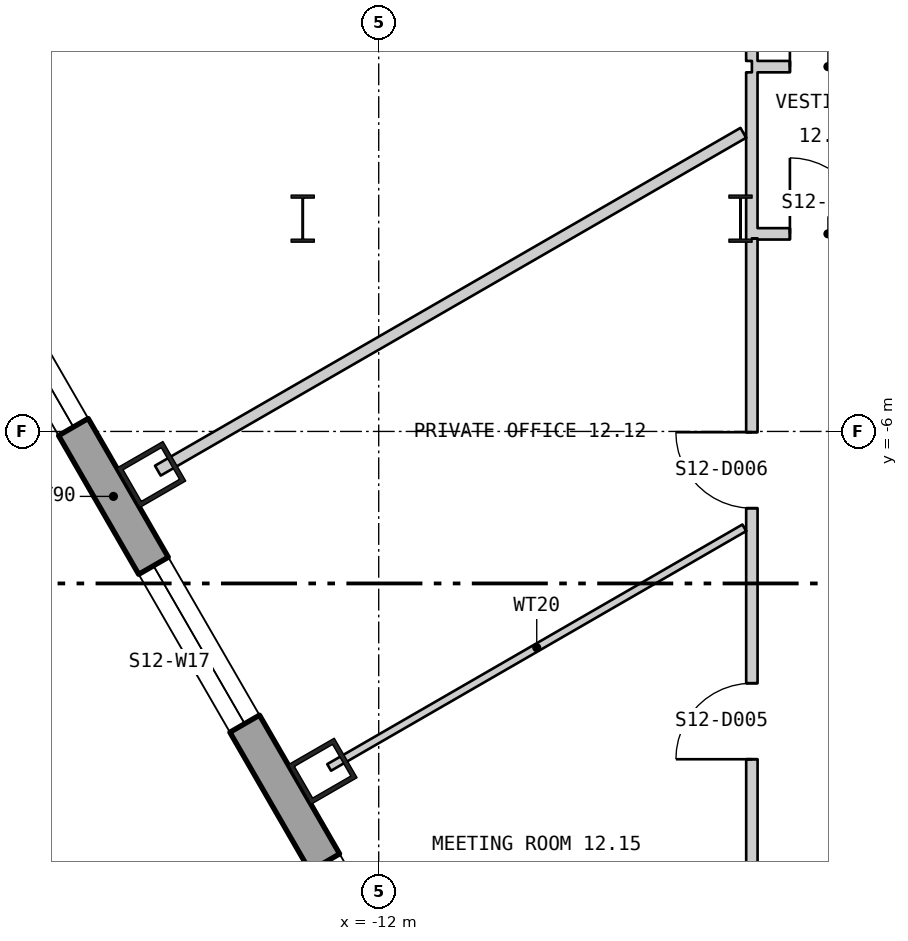
"""IFC4 building model, lengths in metres.
Left out: names, types, materials, properties, quantities, classifications, styles, units other than length and angle.
Written with IfcOpenShell. Run it as: python <this file> out.ifc"""

import sys

from ifc_helpers import new_model, si_unit, direction, frame, frame_2d, origin, origin_2d, place, context, subcontext, project, spatial, polyline, rectangle, hollow_rectangle, i_section, outline, extrude, element, fill, save


model = new_model("IFC4")
c1 = context("Model", 3, precision=1e-05, world=origin(), true_north=direction((0.0, 1.0)))
c2 = subcontext(c1, "Body", "Model", "MODEL_VIEW")
j1 = project(units=[si_unit("LENGTHUNIT", "METRE"), si_unit("PLANEANGLEUNIT", "RADIAN")], contexts=[c1])
p1 = place(None, origin())
s1 = spatial("IfcSite", under=j1, at=p1, CompositionType="ELEMENT")
p2 = place(p1, origin())
s2 = spatial("IfcBuilding", under=s1, at=p2, CompositionType="ELEMENT")
p3 = place(p2, frame((0.0, 0.0, 163.2)))
s3 = spatial("IfcBuildingStorey", under=s2, at=p3, CompositionType="ELEMENT", Elevation=163.2)
for number, where, z_axis, x_axis in (
    (1, (-14.992, -6.567, 0.0), (0.0, 0.0, 1.0), (0.5, -0.866, 0.0)),
    (2, (-12.738, -10.471, 0.0), (0.0, 0.0, 1.0), (0.5, -0.866, 0.0)),
):
    element("IfcColumn", number, at=place(p3, frame(where, z_axis=z_axis, x_axis=x_axis)), inside=s3, PredefinedType="COLUMN", context=c2, shape_type="SweptSolid", body=[
        extrude(hollow_rectangle(XDim=0.6, YDim=0.7, WallThickness=0.06, at=origin_2d()), origin(), (0.0, 0.0, 1.0), 3.9),
    ])
for number, where, z_axis, x_axis in (
    (3, (-7.24, -3.2, 0.0), (0.0, 0.0, 1.0), (1.0, 0.0, 0.0)),
    (4, (-13.0, -3.2, 0.0), (0.0, 0.0, 1.0), (1.0, 0.0, 0.0)),
):
    element("IfcColumn", number, at=place(p3, frame(where, z_axis=z_axis, x_axis=x_axis)), inside=s3, PredefinedType="COLUMN", context=c2, shape_type="SweptSolid", body=[
        extrude(i_section(OverallWidth=0.305, OverallDepth=0.62, WebThickness=0.021, FlangeThickness=0.04, at=origin_2d()), origin(), (0.0, 0.0, 1.0), 3.9),
    ])
p4 = place(p3, frame((-26.925, 12.951, -0.18), z_axis=(0.0, 0.0, 1.0), x_axis=(0.499999764979, -0.866025539474, 0.0)))
e5 = element("IfcWall", 5, at=p4, inside=s3, PredefinedType="SOLIDWALL", context=c2, shape_type="SweptSolid", body=[
    extrude(outline(polyline([(-0.13, -0.225), (45.87, -0.225), (45.61, 0.225), (0.13, 0.225), (-0.13, -0.225)])), origin(), (0.0, 0.0, 1.0), 3.68),
])
p5 = place(p4, frame((1.424, 0.0, 1.08)))
e6 = element("IfcOpeningElement", 6, at=p5, cuts=e5, PredefinedType="OPENING", context=c2, shape_type="SweptSolid", body=[
    extrude(rectangle(XDim=2.4, YDim=2.0, at=frame_2d((1.2, 1.0))), frame((0.0, 0.235, 0.0), z_axis=(0.0, -1.0, 0.0), x_axis=(1.0, 0.0, 0.0)), (0.0, 0.0, 1.0), 0.47),
])
p6 = place(p4, frame((5.893, 0.0, 1.08)))
e7 = element("IfcOpeningElement", 7, at=p6, cuts=e5, PredefinedType="OPENING", context=c2, shape_type="SweptSolid", body=[
    extrude(rectangle(XDim=2.4, YDim=2.0, at=frame_2d((1.2, 1.0))), frame((0.0, 0.235, 0.0), z_axis=(0.0, -1.0, 0.0), x_axis=(1.0, 0.0, 0.0)), (0.0, 0.0, 1.0), 0.47),
])
p7 = place(p4, frame((10.401, 0.0, 1.08)))
e8 = element("IfcOpeningElement", 8, at=p7, cuts=e5, PredefinedType="OPENING", context=c2, shape_type="SweptSolid", body=[
    extrude(rectangle(XDim=2.4, YDim=2.0, at=frame_2d((1.2, 1.0))), frame((0.0, 0.235, 0.0), z_axis=(0.0, -1.0, 0.0), x_axis=(1.0, 0.0, 0.0)), (0.0, 0.0, 1.0), 0.47),
])
p8 = place(p4, frame((14.909, 0.0, 1.08)))
e9 = element("IfcOpeningElement", 9, at=p8, cuts=e5, PredefinedType="OPENING", context=c2, shape_type="SweptSolid", body=[
    extrude(rectangle(XDim=2.4, YDim=2.0, at=frame_2d((1.2, 1.0))), frame((0.0, 0.235, 0.0), z_axis=(0.0, -1.0, 0.0), x_axis=(1.0, 0.0, 0.0)), (0.0, 0.0, 1.0), 0.47),
])
p9 = place(p4, frame((19.416, 0.0, 1.08)))
e10 = element("IfcOpeningElement", 10, at=p9, cuts=e5, PredefinedType="OPENING", context=c2, shape_type="SweptSolid", body=[
    extrude(rectangle(XDim=2.4, YDim=2.0, at=frame_2d((1.2, 1.0))), frame((0.0, 0.235, 0.0), z_axis=(0.0, -1.0, 0.0), x_axis=(1.0, 0.0, 0.0)), (0.0, 0.0, 1.0), 0.47),
])
p10 = place(p4, frame((23.924, 0.0, 1.08)))
e11 = element("IfcOpeningElement", 11, at=p10, cuts=e5, PredefinedType="OPENING", context=c2, shape_type="SweptSolid", body=[
    extrude(rectangle(XDim=2.4, YDim=2.0, at=frame_2d((1.2, 1.0))), frame((0.0, 0.235, 0.0), z_axis=(0.0, -1.0, 0.0), x_axis=(1.0, 0.0, 0.0)), (0.0, 0.0, 1.0), 0.47),
])
p11 = place(p4, frame((28.431, 0.0, 1.08)))
e12 = element("IfcOpeningElement", 12, at=p11, cuts=e5, PredefinedType="OPENING", context=c2, shape_type="SweptSolid", body=[
    extrude(rectangle(XDim=2.4, YDim=2.0, at=frame_2d((1.2, 1.0))), frame((0.0, 0.235, 0.0), z_axis=(0.0, -1.0, 0.0), x_axis=(1.0, 0.0, 0.0)), (0.0, 0.0, 1.0), 0.47),
])
p12 = place(p4, frame((32.939, 0.0, 1.08)))
e13 = element("IfcOpeningElement", 13, at=p12, cuts=e5, PredefinedType="OPENING", context=c2, shape_type="SweptSolid", body=[
    extrude(rectangle(XDim=2.4, YDim=2.0, at=frame_2d((1.2, 1.0))), frame((0.0, 0.235, 0.0), z_axis=(0.0, -1.0, 0.0), x_axis=(1.0, 0.0, 0.0)), (0.0, 0.0, 1.0), 0.47),
])
p13 = place(p4, frame((37.447, 0.0, 1.08)))
e14 = element("IfcOpeningElement", 14, at=p13, cuts=e5, PredefinedType="OPENING", context=c2, shape_type="SweptSolid", body=[
    extrude(rectangle(XDim=2.4, YDim=2.0, at=frame_2d((1.2, 1.0))), frame((0.0, 0.235, 0.0), z_axis=(0.0, -1.0, 0.0), x_axis=(1.0, 0.0, 0.0)), (0.0, 0.0, 1.0), 0.47),
])
p14 = place(p4, frame((41.916, 0.0, 1.08)))
e15 = element("IfcOpeningElement", 15, at=p14, cuts=e5, PredefinedType="OPENING", context=c2, shape_type="SweptSolid", body=[
    extrude(rectangle(XDim=2.4, YDim=2.0, at=frame_2d((1.2, 1.0))), frame((0.0, 0.235, 0.0), z_axis=(0.0, -1.0, 0.0), x_axis=(1.0, 0.0, 0.0)), (0.0, 0.0, 1.0), 0.47),
])
p15 = place(p3, frame((-14.906, -6.516, 0.0), z_axis=(0.0, 0.0, 1.0), x_axis=(0.866138783521, 0.499803569096, 0.0)))
e16 = element("IfcWall", 16, at=p15, inside=s3, PredefinedType="PARTITIONING", context=c2, shape_type="SweptSolid", body=[
    extrude(rectangle(XDim=8.893, YDim=0.15, at=frame_2d((4.447, 0.0))), origin(), (0.0, 0.0, 1.0), 3.7),
])
p16 = place(p3, frame((-12.652, -10.421, 0.0), z_axis=(0.0, 0.0, 1.0), x_axis=(0.866058850386, 0.499942064311, 0.0)))
e17 = element("IfcWall", 17, at=p16, inside=s3, PredefinedType="PARTITIONING", context=c2, shape_type="SweptSolid", body=[
    extrude(rectangle(XDim=6.307, YDim=0.1, at=frame_2d((3.153, 0.0))), origin(), (0.0, 0.0, 1.0), 3.7),
])
p17 = place(p3, frame((-7.091, -1.125, 0.0), z_axis=(0.0, 0.0, 1.0), x_axis=(0.0, 1.0, 0.0)))
e18 = element("IfcWall", 18, at=p17, inside=s3, PredefinedType="PARTITIONING", context=c2, shape_type="SweptSolid", body=[
    extrude(rectangle(XDim=1.4, YDim=0.15, at=frame_2d((0.7, 0.0))), origin(), (0.0, 0.0, 1.0), 3.7),
])
p18 = place(p3, frame((-7.09, -1.2, 0.0), z_axis=(0.0, 0.0, 1.0), x_axis=(1.0, 0.0, 0.0)))
e19 = element("IfcWall", 19, at=p18, inside=s3, PredefinedType="PARTITIONING", context=c2, shape_type="SweptSolid", body=[
    extrude(rectangle(XDim=14.255, YDim=0.15, at=frame_2d((7.128, 0.0))), origin(), (0.0, 0.0, 1.0), 3.7),
])
p19 = place(p18, frame((0.5, 0.0, 0.0)))
e20 = element("IfcOpeningElement", 20, at=p19, cuts=e19, PredefinedType="OPENING", context=c2, shape_type="SweptSolid", body=[
    extrude(rectangle(XDim=1.0, YDim=2.1, at=frame_2d((0.5, 1.05))), frame((0.0, 0.085, 0.0), z_axis=(0.0, -1.0, 0.0), x_axis=(1.0, 0.0, 0.0)), (0.0, 0.0, 1.0), 0.17),
])
p20 = place(p18, frame((7.338, 0.0, 0.0)))
e21 = element("IfcOpeningElement", 21, at=p20, cuts=e19, PredefinedType="OPENING", context=c2, shape_type="SweptSolid", body=[
    extrude(rectangle(XDim=1.0, YDim=2.1, at=frame_2d((0.5, 1.05))), frame((0.0, 0.085, 0.0), z_axis=(0.0, -1.0, 0.0), x_axis=(1.0, 0.0, 0.0)), (0.0, 0.0, 1.0), 0.17),
])
p21 = place(p3, frame((-7.09, -13.675, 0.0), z_axis=(0.0, 0.0, 1.0), x_axis=(-7.8316201e-05, 0.999999996933, 0.0)))
e22 = element("IfcWall", 22, at=p21, inside=s3, PredefinedType="PARTITIONING", context=c2, shape_type="SweptSolid", body=[
    extrude(rectangle(XDim=10.215, YDim=0.15, at=frame_2d((5.107, 0.0))), origin(), (0.0, 0.0, 1.0), 3.11),
])
p22 = place(p21, frame((3.362, 0.0, 0.0)))
e23 = element("IfcOpeningElement", 23, at=p22, cuts=e22, PredefinedType="OPENING", context=c2, shape_type="SweptSolid", body=[
    extrude(rectangle(XDim=1.0, YDim=2.1, at=frame_2d((0.5, 1.05))), frame((0.0, 0.085, 0.0), z_axis=(0.0, -1.0, 0.0), x_axis=(1.0, 0.0, 0.0)), (0.0, 0.0, 1.0), 0.17),
])
p23 = place(p21, frame((6.665, 0.0, 0.0)))
e24 = element("IfcOpeningElement", 24, at=p23, cuts=e22, PredefinedType="OPENING", context=c2, shape_type="SweptSolid", body=[
    extrude(rectangle(XDim=1.0, YDim=2.1, at=frame_2d((0.5, 1.05))), frame((0.0, 0.085, 0.0), z_axis=(0.0, -1.0, 0.0), x_axis=(1.0, 0.0, 0.0)), (0.0, 0.0, 1.0), 0.17),
])
p24 = place(p3, frame((-7.091, -3.46, 0.0), z_axis=(0.0, 0.0, 1.0), x_axis=(-9.153318e-05, 0.999999995811, 0.0)))
e25 = element("IfcWall", 25, at=p24, inside=s3, PredefinedType="PARTITIONING", context=c2, shape_type="SweptSolid", body=[
    extrude(rectangle(XDim=2.185, YDim=0.15, at=frame_2d((1.093, 0.0))), origin(), (0.0, 0.0, 1.0), 3.7),
])
p25 = place(p3, frame((-7.016, -3.4, 0.0), z_axis=(0.0, 0.0, 1.0), x_axis=(1.0, 0.0, 0.0)))
e26 = element("IfcWall", 26, at=p25, inside=s3, PredefinedType="PARTITIONING", context=c2, shape_type="SweptSolid", body=[
    extrude(rectangle(XDim=1.852, YDim=0.15, at=frame_2d((0.926, 0.0))), origin(), (0.0, 0.0, 1.0), 3.7),
])
p26 = place(p25, frame((0.426, 0.0, 0.0)))
e27 = element("IfcOpeningElement", 27, at=p26, cuts=e26, PredefinedType="OPENING", context=c2, shape_type="SweptSolid", body=[
    extrude(rectangle(XDim=1.0, YDim=2.1, at=frame_2d((0.5, 1.05))), frame((0.0, 0.085, 0.0), z_axis=(0.0, -1.0, 0.0), x_axis=(1.0, 0.0, 0.0)), (0.0, 0.0, 1.0), 0.17),
])
p27 = place(p9, origin())
e28 = element("IfcWindow", 28, at=p27, inside=s3, PartitioningType="SINGLE_PANEL", PredefinedType="WINDOW", context=c2, shape_type="SweptSolid", body=[
    extrude(rectangle(XDim=2.4, YDim=2.0, at=frame_2d((1.2, 1.0))), frame((0.0, 0.105, 0.0), z_axis=(0.0, -1.0, 0.0), x_axis=(1.0, 0.0, 0.0)), (0.0, 0.0, 1.0), 0.06),
])
fill(e10, e28)
p28 = place(p10, origin())
e29 = element("IfcWindow", 29, at=p28, inside=s3, PartitioningType="SINGLE_PANEL", PredefinedType="WINDOW", context=c2, shape_type="SweptSolid", body=[
    extrude(rectangle(XDim=2.4, YDim=2.0, at=frame_2d((1.2, 1.0))), frame((0.0, 0.105, 0.0), z_axis=(0.0, -1.0, 0.0), x_axis=(1.0, 0.0, 0.0)), (0.0, 0.0, 1.0), 0.06),
])
fill(e11, e29)
p29 = place(p11, origin())
e30 = element("IfcWindow", 30, at=p29, inside=s3, PartitioningType="SINGLE_PANEL", PredefinedType="WINDOW", context=c2, shape_type="SweptSolid", body=[
    extrude(rectangle(XDim=2.4, YDim=2.0, at=frame_2d((1.2, 1.0))), frame((0.0, 0.105, 0.0), z_axis=(0.0, -1.0, 0.0), x_axis=(1.0, 0.0, 0.0)), (0.0, 0.0, 1.0), 0.06),
])
fill(e12, e30)
p30 = place(p19, origin())
e31 = element("IfcDoor", 31, at=p30, inside=s3, OperationType="SINGLE_SWING_RIGHT", PredefinedType="DOOR", context=c2, shape_type="SweptSolid", body=[
    extrude(rectangle(XDim=1.0, YDim=2.1, at=frame_2d((0.5, 1.05))), frame((0.0, 0.025, 0.0), z_axis=(0.0, -1.0, 0.0), x_axis=(1.0, 0.0, 0.0)), (0.0, 0.0, 1.0), 0.05),
])
fill(e20, e31)
p31 = place(p22, origin())
e32 = element("IfcDoor", 32, at=p31, inside=s3, OperationType="SINGLE_SWING_RIGHT", PredefinedType="DOOR", context=c2, shape_type="SweptSolid", body=[
    extrude(rectangle(XDim=1.0, YDim=2.1, at=frame_2d((0.5, 1.05))), frame((0.0, 0.025, 0.0), z_axis=(0.0, -1.0, 0.0), x_axis=(1.0, 0.0, 0.0)), (0.0, 0.0, 1.0), 0.05),
])
fill(e23, e32)
p32 = place(p23, origin())
e33 = element("IfcDoor", 33, at=p32, inside=s3, OperationType="SINGLE_SWING_LEFT", PredefinedType="DOOR", context=c2, shape_type="SweptSolid", body=[
    extrude(rectangle(XDim=1.0, YDim=2.1, at=frame_2d((0.5, 1.05))), frame((0.0, 0.025, 0.0), z_axis=(0.0, -1.0, 0.0), x_axis=(1.0, 0.0, 0.0)), (0.0, 0.0, 1.0), 0.05),
])
fill(e24, e33)
p33 = place(p26, origin())
e34 = element("IfcDoor", 34, at=p33, inside=s3, OperationType="SINGLE_SWING_RIGHT", PredefinedType="DOOR", context=c2, shape_type="SweptSolid", body=[
    extrude(rectangle(XDim=1.0, YDim=2.1, at=frame_2d((0.5, 1.05))), frame((0.0, 0.025, 0.0), z_axis=(0.0, -1.0, 0.0), x_axis=(1.0, 0.0, 0.0)), (0.0, 0.0, 1.0), 0.05),
])
fill(e27, e34)
save(model, sys.argv[1])
